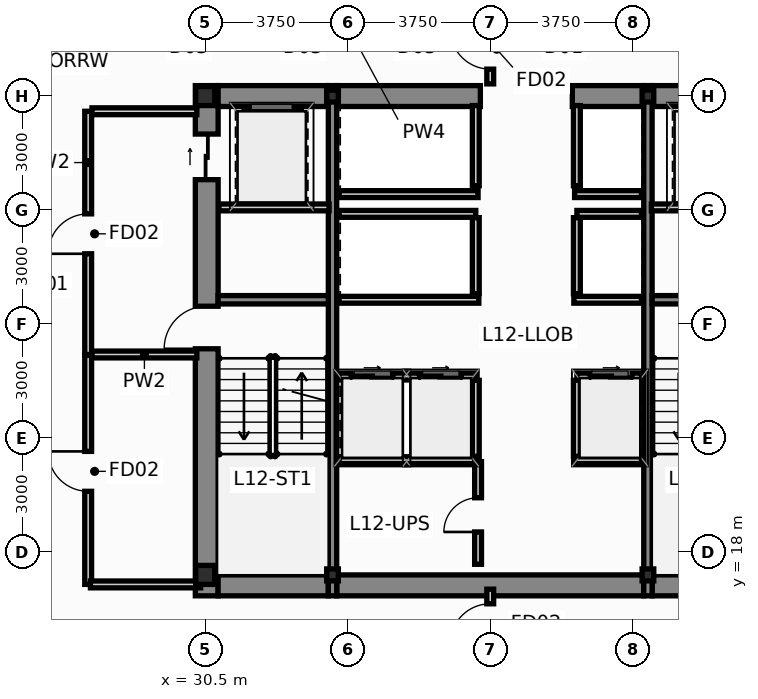
"""IFC4 building model, lengths in metres.
Left out: names, types, materials, properties, quantities, classifications, styles, units other than length and angle.
Written with IfcOpenShell. Run it as: python <this file> out.ifc"""

import sys

from ifc_helpers import new_model, si_unit, direction, frame, frame_2d, origin, origin_2d, place, context, subcontext, project, spatial, rectangle, i_section, extrude, source, transform, mapped, element, fill, save


model = new_model("IFC4")
c1 = context("Model", 3, precision=1e-05, world=origin(), true_north=direction((0.0, 1.0)))
c2 = subcontext(c1, "Body", "Model", "MODEL_VIEW")
j1 = project(units=[si_unit("LENGTHUNIT", "METRE"), si_unit("PLANEANGLEUNIT", "RADIAN")], contexts=[c1])
p1 = place(None, origin())
s1 = spatial("IfcSite", under=j1, at=p1, CompositionType="ELEMENT")
p2 = place(p1, origin())
s2 = spatial("IfcBuilding", under=s1, at=p2, CompositionType="ELEMENT")
p3 = place(p2, frame((0.0, 0.0, 49.5)))
s3 = spatial("IfcBuildingStorey", under=s2, at=p3, CompositionType="ELEMENT", Elevation=49.5)
m1 = source(origin(), c2, "Body", "SweptSolid", [
    extrude(i_section(OverallWidth=0.5, OverallDepth=0.5, WebThickness=0.028, FlangeThickness=0.04, at=origin_2d()), origin(), (0.0, 0.0, 1.0), 3.65),
])
for number, where, z_axis, x_axis in (
    (1, (30.5, 17.4, 0.0), (0.0, 0.0, 1.0), (1.0, 0.0, 0.0)),
    (2, (30.5, 30.0, 0.0), (0.0, 0.0, 1.0), (1.0, 0.0, 0.0)),
):
    element("IfcColumn", number, at=place(p3, frame(where, z_axis=z_axis, x_axis=x_axis)), inside=s3, PredefinedType="COLUMN", context=c2, shape_type="MappedRepresentation", body=[
        mapped(m1, transform((0.0, 0.0, 0.0), scale=1.0)),
    ])
m2 = source(origin(), c2, "Body", "SweptSolid", [
    extrude(i_section(OverallWidth=0.307, OverallDepth=0.315, WebThickness=0.012, FlangeThickness=0.019, at=origin_2d()), origin(), (0.0, 0.0, 1.0), 3.65),
])
for number, where, z_axis, x_axis in (
    (3, (33.85, 17.4, 0.0), (0.0, 0.0, 1.0), (1.0, 0.0, 0.0)),
    (4, (42.15, 17.4, 0.0), (0.0, 0.0, 1.0), (1.0, 0.0, 0.0)),
    (5, (33.85, 30.0, 0.0), (0.0, 0.0, 1.0), (1.0, 0.0, 0.0)),
    (6, (42.15, 30.0, 0.0), (0.0, 0.0, 1.0), (1.0, 0.0, 0.0)),
):
    element("IfcColumn", number, at=place(p3, frame(where, z_axis=z_axis, x_axis=x_axis)), inside=s3, PredefinedType="COLUMN", context=c2, shape_type="MappedRepresentation", body=[
        mapped(m2, transform((0.0, 0.0, 0.0), scale=1.0)),
    ])
p4 = place(p3, frame((30.54, 16.85, 0.0), z_axis=(0.0, 0.0, 1.0), x_axis=(0.0, 1.0, 0.0)))
e7 = element("IfcWall", 7, at=p4, inside=s3, PredefinedType="SHEAR", context=c2, shape_type="SweptSolid", body=[
    extrude(rectangle(XDim=13.425, YDim=0.6, at=frame_2d((6.712, 0.0))), origin(), (0.0, 0.0, 1.0), 3.65),
])
p5 = place(p4, frame((6.5, 0.0, 0.0)))
e8 = element("IfcOpeningElement", 8, at=p5, cuts=e7, PredefinedType="OPENING", context=c2, shape_type="SweptSolid", body=[
    extrude(rectangle(XDim=1.12, YDim=2.15, at=frame_2d((0.56, 1.075))), frame((0.0, 0.312, 0.0), z_axis=(0.0, -1.0, 0.0), x_axis=(1.0, 0.0, 0.0)), (0.0, 0.0, 1.0), 0.624),
])
p6 = place(p4, frame((10.95, 0.0, 0.0)))
e9 = element("IfcOpeningElement", 9, at=p6, cuts=e7, PredefinedType="OPENING", context=c2, shape_type="SweptSolid", body=[
    extrude(rectangle(XDim=1.2, YDim=2.2, at=frame_2d((0.6, 1.1))), frame((0.0, 0.312, 0.0), z_axis=(0.0, -1.0, 0.0), x_axis=(1.0, 0.0, 0.0)), (0.0, 0.0, 1.0), 0.624),
])
p7 = place(p3, frame((30.84, 17.125, 0.0), z_axis=(0.0, 0.0, 1.0), x_axis=(1.0, 0.0, 0.0)))
e10 = element("IfcWall", 10, at=p7, inside=s3, PredefinedType="SHEAR", context=c2, shape_type="SweptSolid", body=[
    extrude(rectangle(XDim=2.9, YDim=0.55, at=frame_2d((1.45, 0.0))), origin(), (0.0, 0.0, 1.0), 3.65),
])
p8 = place(p3, frame((33.96, 17.125, 0.0), z_axis=(0.0, 0.0, 1.0), x_axis=(1.0, 0.0, 0.0)))
e11 = element("IfcWall", 11, at=p8, inside=s3, PredefinedType="SHEAR", context=c2, shape_type="SweptSolid", body=[
    extrude(rectangle(XDim=8.08, YDim=0.55, at=frame_2d((4.04, 0.0))), origin(), (0.0, 0.0, 1.0), 3.65),
])
for number, where, z_axis, x_axis in (
    (12, (42.26, 17.125, 0.0), (0.0, 0.0, 1.0), (1.0, 0.0, 0.0)),
    (13, (30.84, 30.0, 0.0), (0.0, 0.0, 1.0), (1.0, 0.0, 0.0)),
):
    element("IfcWall", number, at=place(p3, frame(where, z_axis=z_axis, x_axis=x_axis)), inside=s3, PredefinedType="SHEAR", context=c2, shape_type="SweptSolid", body=[
        extrude(rectangle(XDim=2.9, YDim=0.55, at=frame_2d((1.45, 0.0))), origin(), (0.0, 0.0, 1.0), 3.65),
    ])
p9 = place(p3, frame((33.96, 30.0, 0.0), z_axis=(0.0, 0.0, 1.0), x_axis=(1.0, 0.0, 0.0)))
e14 = element("IfcWall", 14, at=p9, inside=s3, PredefinedType="SHEAR", context=c2, shape_type="SweptSolid", body=[
    extrude(rectangle(XDim=3.78, YDim=0.55, at=frame_2d((1.89, 0.0))), origin(), (0.0, 0.0, 1.0), 3.65),
])
p10 = place(p3, frame((40.16, 30.0, 0.0), z_axis=(0.0, 0.0, 1.0), x_axis=(1.0, 0.0, 0.0)))
e15 = element("IfcWall", 15, at=p10, inside=s3, PredefinedType="SHEAR", context=c2, shape_type="SweptSolid", body=[
    extrude(rectangle(XDim=1.88, YDim=0.55, at=frame_2d((0.94, 0.0))), origin(), (0.0, 0.0, 1.0), 3.65),
])
p11 = place(p3, frame((42.26, 30.0, 0.0), z_axis=(0.0, 0.0, 1.0), x_axis=(1.0, 0.0, 0.0)))
e16 = element("IfcWall", 16, at=p11, inside=s3, PredefinedType="SHEAR", context=c2, shape_type="SweptSolid", body=[
    extrude(rectangle(XDim=2.9, YDim=0.55, at=frame_2d((1.45, 0.0))), origin(), (0.0, 0.0, 1.0), 3.65),
])
for number, where, z_axis, x_axis in (
    (17, (33.85, 16.85, 0.0), (0.0, 0.0, 1.0), (0.0, 1.0, 0.0)),
    (18, (42.15, 16.85, 0.0), (0.0, 0.0, 1.0), (0.0, 1.0, 0.0)),
):
    element("IfcWall", number, at=place(p3, frame(where, z_axis=z_axis, x_axis=x_axis)), inside=s3, PredefinedType="SHEAR", context=c2, shape_type="SweptSolid", body=[
        extrude(rectangle(XDim=13.425, YDim=0.22, at=frame_2d((6.712, 0.0))), origin(), (0.0, 0.0, 1.0), 3.65),
    ])
for number, where, z_axis, x_axis in (
    (19, (30.84, 24.64, 0.0), (0.0, 0.0, 1.0), (1.0, 0.0, 0.0)),
    (20, (42.26, 24.64, 0.0), (0.0, 0.0, 1.0), (1.0, 0.0, 0.0)),
):
    element("IfcWall", number, at=place(p3, frame(where, z_axis=z_axis, x_axis=x_axis)), inside=s3, PredefinedType="SHEAR", context=c2, shape_type="SweptSolid", body=[
        extrude(rectangle(XDim=2.9, YDim=0.22, at=frame_2d((1.45, 0.0))), origin(), (0.0, 0.0, 1.0), 3.65),
    ])
p12 = place(p3, frame((34.02, 22.62, 0.0), z_axis=(0.0, 0.0, 1.0), x_axis=(1.0, 0.0, 0.0)))
e21 = element("IfcWall", 21, at=p12, inside=s3, PredefinedType="PARTITIONING", context=c2, shape_type="SweptSolid", body=[
    extrude(rectangle(XDim=3.6, YDim=0.18, at=frame_2d((1.8, 0.0))), origin(), (0.0, 0.0, 1.0), 3.4),
])
p13 = place(p12, frame((0.32, 0.0, 0.0)))
e22 = element("IfcOpeningElement", 22, at=p13, cuts=e21, PredefinedType="OPENING", context=c2, shape_type="SweptSolid", body=[
    extrude(rectangle(XDim=1.1, YDim=2.2, at=frame_2d((0.55, 1.1))), frame((0.0, 0.102, 0.0), z_axis=(0.0, -1.0, 0.0), x_axis=(1.0, 0.0, 0.0)), (0.0, 0.0, 1.0), 0.204),
])
p14 = place(p12, frame((2.12, 0.0, 0.0)))
e23 = element("IfcOpeningElement", 23, at=p14, cuts=e21, PredefinedType="OPENING", context=c2, shape_type="SweptSolid", body=[
    extrude(rectangle(XDim=1.1, YDim=2.2, at=frame_2d((0.55, 1.1))), frame((0.0, 0.102, 0.0), z_axis=(0.0, -1.0, 0.0), x_axis=(1.0, 0.0, 0.0)), (0.0, 0.0, 1.0), 0.204),
])
p15 = place(p3, frame((40.28, 22.62, 0.0), z_axis=(0.0, 0.0, 1.0), x_axis=(1.0, 0.0, 0.0)))
e24 = element("IfcWall", 24, at=p15, inside=s3, PredefinedType="PARTITIONING", context=c2, shape_type="SweptSolid", body=[
    extrude(rectangle(XDim=1.7, YDim=0.18, at=frame_2d((0.85, 0.0))), origin(), (0.0, 0.0, 1.0), 3.4),
])
p16 = place(p15, frame((0.35, 0.0, 0.0)))
e25 = element("IfcOpeningElement", 25, at=p16, cuts=e24, PredefinedType="OPENING", context=c2, shape_type="SweptSolid", body=[
    extrude(rectangle(XDim=1.1, YDim=2.2, at=frame_2d((0.55, 1.1))), frame((0.0, 0.102, 0.0), z_axis=(0.0, -1.0, 0.0), x_axis=(1.0, 0.0, 0.0)), (0.0, 0.0, 1.0), 0.204),
])
for number, where, z_axis, x_axis in (
    (26, (37.62, 20.52, 0.0), (0.0, 0.0, 1.0), (0.0, 1.0, 0.0)),
    (27, (40.28, 20.52, 0.0), (0.0, 0.0, 1.0), (0.0, 1.0, 0.0)),
):
    element("IfcWall", number, at=place(p3, frame(where, z_axis=z_axis, x_axis=x_axis)), inside=s3, PredefinedType="PARTITIONING", context=c2, shape_type="SweptSolid", body=[
        extrude(rectangle(XDim=2.0, YDim=0.18, at=frame_2d((1.0, 0.0))), origin(), (0.0, 0.0, 1.0), 3.4),
    ])
p17 = place(p3, frame((34.02, 26.9, 0.0), z_axis=(0.0, 0.0, 1.0), x_axis=(1.0, 0.0, 0.0)))
e28 = element("IfcWall", 28, at=p17, inside=s3, PredefinedType="PARTITIONING", context=c2, shape_type="SweptSolid", body=[
    extrude(rectangle(XDim=3.6, YDim=0.18, at=frame_2d((1.8, 0.0))), origin(), (0.0, 0.0, 1.0), 3.4),
])
p18 = place(p3, frame((40.28, 26.9, 0.0), z_axis=(0.0, 0.0, 1.0), x_axis=(1.0, 0.0, 0.0)))
e29 = element("IfcWall", 29, at=p18, inside=s3, PredefinedType="PARTITIONING", context=c2, shape_type="SweptSolid", body=[
    extrude(rectangle(XDim=1.7, YDim=0.18, at=frame_2d((0.85, 0.0))), origin(), (0.0, 0.0, 1.0), 3.4),
])
for number, where, z_axis, x_axis in (
    (30, (37.62, 24.8, 0.0), (0.0, 0.0, 1.0), (0.0, 1.0, 0.0)),
    (31, (40.28, 24.8, 0.0), (0.0, 0.0, 1.0), (0.0, 1.0, 0.0)),
):
    element("IfcWall", number, at=place(p3, frame(where, z_axis=z_axis, x_axis=x_axis)), inside=s3, PredefinedType="PARTITIONING", context=c2, shape_type="SweptSolid", body=[
        extrude(rectangle(XDim=2.0, YDim=0.18, at=frame_2d((1.0, 0.0))), origin(), (0.0, 0.0, 1.0), 3.4),
    ])
p19 = place(p3, frame((34.02, 24.64, 0.0), z_axis=(0.0, 0.0, 1.0), x_axis=(1.0, 0.0, 0.0)))
e32 = element("IfcWall", 32, at=p19, inside=s3, PredefinedType="PARTITIONING", context=c2, shape_type="SweptSolid", body=[
    extrude(rectangle(XDim=3.68, YDim=0.18, at=frame_2d((1.84, 0.0))), origin(), (0.0, 0.0, 1.0), 3.4),
])
p20 = place(p3, frame((40.2, 24.64, 0.0), z_axis=(0.0, 0.0, 1.0), x_axis=(1.0, 0.0, 0.0)))
e33 = element("IfcWall", 33, at=p20, inside=s3, PredefinedType="PARTITIONING", context=c2, shape_type="SweptSolid", body=[
    extrude(rectangle(XDim=1.78, YDim=0.18, at=frame_2d((0.89, 0.0))), origin(), (0.0, 0.0, 1.0), 3.4),
])
p21 = place(p3, frame((34.02, 27.42, 0.0), z_axis=(0.0, 0.0, 1.0), x_axis=(1.0, 0.0, 0.0)))
e34 = element("IfcWall", 34, at=p21, inside=s3, PredefinedType="PARTITIONING", context=c2, shape_type="SweptSolid", body=[
    extrude(rectangle(XDim=3.66, YDim=0.18, at=frame_2d((1.83, 0.0))), origin(), (0.0, 0.0, 1.0), 3.4),
])
p22 = place(p3, frame((40.22, 27.42, 0.0), z_axis=(0.0, 0.0, 1.0), x_axis=(1.0, 0.0, 0.0)))
e35 = element("IfcWall", 35, at=p22, inside=s3, PredefinedType="PARTITIONING", context=c2, shape_type="SweptSolid", body=[
    extrude(rectangle(XDim=1.76, YDim=0.18, at=frame_2d((0.88, 0.0))), origin(), (0.0, 0.0, 1.0), 3.4),
])
for number, where, z_axis, x_axis in (
    (36, (37.62, 27.64, 0.0), (0.0, 0.0, 1.0), (0.0, 1.0, 0.0)),
    (37, (40.28, 27.64, 0.0), (0.0, 0.0, 1.0), (0.0, 1.0, 0.0)),
):
    element("IfcWall", number, at=place(p3, frame(where, z_axis=z_axis, x_axis=x_axis)), inside=s3, PredefinedType="PARTITIONING", context=c2, shape_type="SweptSolid", body=[
        extrude(rectangle(XDim=2.11, YDim=0.18, at=frame_2d((1.055, 0.0))), origin(), (0.0, 0.0, 1.0), 3.4),
    ])
p23 = place(p3, frame((27.42, 23.2, 0.0), z_axis=(0.0, 0.0, 1.0), x_axis=(0.0, 1.0, 0.0)))
e38 = element("IfcWall", 38, at=p23, inside=s3, PredefinedType="PARTITIONING", context=c2, shape_type="SweptSolid", body=[
    extrude(rectangle(XDim=6.4, YDim=0.18, at=frame_2d((3.2, 0.0))), origin(), (0.0, 0.0, 1.0), 3.4),
])
p24 = place(p23, frame((2.65, 0.0, 0.0)))
e39 = element("IfcOpeningElement", 39, at=p24, cuts=e38, PredefinedType="OPENING", context=c2, shape_type="SweptSolid", body=[
    extrude(rectangle(XDim=1.05, YDim=2.15, at=frame_2d((0.525, 1.075))), frame((0.0, 0.102, 0.0), z_axis=(0.0, -1.0, 0.0), x_axis=(1.0, 0.0, 0.0)), (0.0, 0.0, 1.0), 0.204),
])
p25 = place(p3, frame((27.52, 23.2, 0.0), z_axis=(0.0, 0.0, 1.0), x_axis=(1.0, 0.0, 0.0)))
e40 = element("IfcWall", 40, at=p25, inside=s3, PredefinedType="PARTITIONING", context=c2, shape_type="SweptSolid", body=[
    extrude(rectangle(XDim=2.76, YDim=0.18, at=frame_2d((1.38, 0.0))), origin(), (0.0, 0.0, 1.0), 3.4),
])
p26 = place(p3, frame((27.52, 29.6, 0.0), z_axis=(0.0, 0.0, 1.0), x_axis=(1.0, 0.0, 0.0)))
e41 = element("IfcWall", 41, at=p26, inside=s3, PredefinedType="PARTITIONING", context=c2, shape_type="SweptSolid", body=[
    extrude(rectangle(XDim=2.76, YDim=0.18, at=frame_2d((1.38, 0.0))), origin(), (0.0, 0.0, 1.0), 2.783),
])
for number, where, z_axis, x_axis in (
    (42, (30.86, 27.07, 0.0), (0.0, 0.0, 1.0), (1.0, 0.0, 0.0)),
    (43, (42.24, 27.07, 0.0), (0.0, 0.0, 1.0), (1.0, 0.0, 0.0)),
):
    element("IfcWall", number, at=place(p3, frame(where, z_axis=z_axis, x_axis=x_axis)), inside=s3, PredefinedType="PARTITIONING", context=c2, shape_type="SweptSolid", body=[
        extrude(rectangle(XDim=2.9, YDim=0.18, at=frame_2d((1.45, 0.0))), origin(), (0.0, 0.0, 1.0), 3.4),
    ])
p27 = place(p3, frame((34.02, 20.42, 0.0), z_axis=(0.0, 0.0, 1.0), x_axis=(1.0, 0.0, 0.0)))
e44 = element("IfcWall", 44, at=p27, inside=s3, PredefinedType="PARTITIONING", context=c2, shape_type="SweptSolid", body=[
    extrude(rectangle(XDim=3.64, YDim=0.18, at=frame_2d((1.82, 0.0))), origin(), (0.0, 0.0, 1.0), 3.4),
])
p28 = place(p3, frame((40.22, 20.42, 0.0), z_axis=(0.0, 0.0, 1.0), x_axis=(1.0, 0.0, 0.0)))
e45 = element("IfcWall", 45, at=p28, inside=s3, PredefinedType="PARTITIONING", context=c2, shape_type="SweptSolid", body=[
    extrude(rectangle(XDim=1.76, YDim=0.18, at=frame_2d((0.88, 0.0))), origin(), (0.0, 0.0, 1.0), 3.4),
])
p29 = place(p3, frame((37.68, 17.68, 0.0), z_axis=(0.0, 0.0, 1.0), x_axis=(0.0, 1.0, 0.0)))
e46 = element("IfcWall", 46, at=p29, inside=s3, PredefinedType="PARTITIONING", context=c2, shape_type="SweptSolid", body=[
    extrude(rectangle(XDim=2.7, YDim=0.18, at=frame_2d((1.35, 0.0))), origin(), (0.0, 0.0, 1.0), 3.4),
])
p30 = place(p29, frame((0.85, 0.0, 0.0)))
e47 = element("IfcOpeningElement", 47, at=p30, cuts=e46, PredefinedType="OPENING", context=c2, shape_type="SweptSolid", body=[
    extrude(rectangle(XDim=0.9, YDim=2.1, at=frame_2d((0.45, 1.05))), frame((0.0, 0.102, 0.0), z_axis=(0.0, -1.0, 0.0), x_axis=(1.0, 0.0, 0.0)), (0.0, 0.0, 1.0), 0.204),
])
p31 = place(p3, frame((27.42, 17.15, 0.0), z_axis=(0.0, 0.0, 1.0), x_axis=(0.0, 1.0, 0.0)))
e48 = element("IfcWall", 48, at=p31, inside=s3, PredefinedType="PARTITIONING", context=c2, shape_type="SweptSolid", body=[
    extrude(rectangle(XDim=6.03, YDim=0.18, at=frame_2d((3.015, 0.0))), origin(), (0.0, 0.0, 1.0), 3.026),
])
p32 = place(p31, frame((2.45, 0.0, 0.0)))
e49 = element("IfcOpeningElement", 49, at=p32, cuts=e48, PredefinedType="OPENING", context=c2, shape_type="SweptSolid", body=[
    extrude(rectangle(XDim=1.05, YDim=2.15, at=frame_2d((0.525, 1.075))), frame((0.0, 0.102, 0.0), z_axis=(0.0, -1.0, 0.0), x_axis=(1.0, 0.0, 0.0)), (0.0, 0.0, 1.0), 0.204),
])
p33 = place(p3, frame((27.48, 17.15, 0.0), z_axis=(0.0, 0.0, 1.0), x_axis=(1.0, 0.0, 0.0)))
e50 = element("IfcWall", 50, at=p33, inside=s3, PredefinedType="PARTITIONING", context=c2, shape_type="SweptSolid", body=[
    extrude(rectangle(XDim=2.9, YDim=0.18, at=frame_2d((1.45, 0.0))), origin(), (0.0, 0.0, 1.0), 2.783),
])
p34 = place(p3, frame((38.0, 15.205, 0.0), z_axis=(0.0, 0.0, 1.0), x_axis=(0.0, 1.0, 0.0)))
e51 = element("IfcWall", 51, at=p34, inside=s3, PredefinedType="PARTITIONING", context=c2, shape_type="SweptSolid", body=[
    extrude(rectangle(XDim=1.82, YDim=0.18, at=frame_2d((0.91, 0.0))), origin(), (0.0, 0.0, 1.0), 3.4),
])
p35 = place(p34, frame((0.385, 0.0, 0.0)))
e52 = element("IfcOpeningElement", 52, at=p35, cuts=e51, PredefinedType="OPENING", context=c2, shape_type="SweptSolid", body=[
    extrude(rectangle(XDim=1.05, YDim=2.15, at=frame_2d((0.525, 1.075))), frame((0.0, 0.102, 0.0), z_axis=(0.0, -1.0, 0.0), x_axis=(1.0, 0.0, 0.0)), (0.0, 0.0, 1.0), 0.204),
])
p36 = place(p3, frame((38.0, 30.32, 0.0), z_axis=(0.0, 0.0, 1.0), x_axis=(0.0, 1.0, 0.0)))
e53 = element("IfcWall", 53, at=p36, inside=s3, PredefinedType="PARTITIONING", context=c2, shape_type="SweptSolid", body=[
    extrude(rectangle(XDim=1.825, YDim=0.18, at=frame_2d((0.913, 0.0))), origin(), (0.0, 0.0, 1.0), 3.4),
])
p37 = place(p36, frame((0.388, 0.0, 0.0)))
e54 = element("IfcOpeningElement", 54, at=p37, cuts=e53, PredefinedType="OPENING", context=c2, shape_type="SweptSolid", body=[
    extrude(rectangle(XDim=1.05, YDim=2.15, at=frame_2d((0.525, 1.075))), frame((0.0, 0.102, 0.0), z_axis=(0.0, -1.0, 0.0), x_axis=(1.0, 0.0, 0.0)), (0.0, 0.0, 1.0), 0.204),
])
p38 = place(p5, origin())
e55 = element("IfcDoor", 55, at=p38, inside=s3, OperationType="SINGLE_SWING_LEFT", PredefinedType="DOOR", context=c2, shape_type="SweptSolid", body=[
    extrude(rectangle(XDim=1.12, YDim=2.15, at=frame_2d((0.56, 1.075))), frame((0.0, 0.025, 0.0), z_axis=(0.0, -1.0, 0.0), x_axis=(1.0, 0.0, 0.0)), (0.0, 0.0, 1.0), 0.05),
])
fill(e8, e55)
p39 = place(p6, origin())
e56 = element("IfcDoor", 56, at=p39, inside=s3, OperationType="SLIDING_TO_LEFT", PredefinedType="DOOR", context=c2, shape_type="SweptSolid", body=[
    extrude(rectangle(XDim=1.2, YDim=2.2, at=frame_2d((0.6, 1.1))), frame((0.0, 0.025, 0.0), z_axis=(0.0, -1.0, 0.0), x_axis=(1.0, 0.0, 0.0)), (0.0, 0.0, 1.0), 0.05),
])
fill(e9, e56)
p40 = place(p13, origin())
e57 = element("IfcDoor", 57, at=p40, inside=s3, OperationType="SLIDING_TO_LEFT", PredefinedType="DOOR", context=c2, shape_type="SweptSolid", body=[
    extrude(rectangle(XDim=1.1, YDim=2.2, at=frame_2d((0.55, 1.1))), frame((0.0, 0.025, 0.0), z_axis=(0.0, -1.0, 0.0), x_axis=(1.0, 0.0, 0.0)), (0.0, 0.0, 1.0), 0.05),
])
fill(e22, e57)
p41 = place(p14, origin())
e58 = element("IfcDoor", 58, at=p41, inside=s3, OperationType="SLIDING_TO_RIGHT", PredefinedType="DOOR", context=c2, shape_type="SweptSolid", body=[
    extrude(rectangle(XDim=1.1, YDim=2.2, at=frame_2d((0.55, 1.1))), frame((0.0, 0.025, 0.0), z_axis=(0.0, -1.0, 0.0), x_axis=(1.0, 0.0, 0.0)), (0.0, 0.0, 1.0), 0.05),
])
fill(e23, e58)
p42 = place(p16, origin())
e59 = element("IfcDoor", 59, at=p42, inside=s3, OperationType="SLIDING_TO_LEFT", PredefinedType="DOOR", context=c2, shape_type="SweptSolid", body=[
    extrude(rectangle(XDim=1.1, YDim=2.2, at=frame_2d((0.55, 1.1))), frame((0.0, 0.025, 0.0), z_axis=(0.0, -1.0, 0.0), x_axis=(1.0, 0.0, 0.0)), (0.0, 0.0, 1.0), 0.05),
])
fill(e25, e59)
p43 = place(p24, origin())
e60 = element("IfcDoor", 60, at=p43, inside=s3, OperationType="SINGLE_SWING_LEFT", PredefinedType="DOOR", context=c2, shape_type="SweptSolid", body=[
    extrude(rectangle(XDim=1.05, YDim=2.15, at=frame_2d((0.525, 1.075))), frame((0.0, 0.025, 0.0), z_axis=(0.0, -1.0, 0.0), x_axis=(1.0, 0.0, 0.0)), (0.0, 0.0, 1.0), 0.05),
])
fill(e39, e60)
p44 = place(p30, origin())
e61 = element("IfcDoor", 61, at=p44, inside=s3, OperationType="SINGLE_SWING_LEFT", PredefinedType="DOOR", context=c2, shape_type="SweptSolid", body=[
    extrude(rectangle(XDim=0.9, YDim=2.1, at=frame_2d((0.45, 1.05))), frame((0.0, 0.025, 0.0), z_axis=(0.0, -1.0, 0.0), x_axis=(1.0, 0.0, 0.0)), (0.0, 0.0, 1.0), 0.05),
])
fill(e47, e61)
p45 = place(p32, origin())
e62 = element("IfcDoor", 62, at=p45, inside=s3, OperationType="SINGLE_SWING_RIGHT", PredefinedType="DOOR", context=c2, shape_type="SweptSolid", body=[
    extrude(rectangle(XDim=1.05, YDim=2.15, at=frame_2d((0.525, 1.075))), frame((0.0, 0.025, 0.0), z_axis=(0.0, -1.0, 0.0), x_axis=(1.0, 0.0, 0.0)), (0.0, 0.0, 1.0), 0.05),
])
fill(e49, e62)
p46 = place(p35, origin())
e63 = element("IfcDoor", 63, at=p46, inside=s3, OperationType="SINGLE_SWING_LEFT", PredefinedType="DOOR", context=c2, shape_type="SweptSolid", body=[
    extrude(rectangle(XDim=1.05, YDim=2.15, at=frame_2d((0.525, 1.075))), frame((0.0, 0.025, 0.0), z_axis=(0.0, -1.0, 0.0), x_axis=(1.0, 0.0, 0.0)), (0.0, 0.0, 1.0), 0.05),
])
fill(e52, e63)
p47 = place(p37, origin())
e64 = element("IfcDoor", 64, at=p47, inside=s3, OperationType="SINGLE_SWING_RIGHT", PredefinedType="DOOR", context=c2, shape_type="SweptSolid", body=[
    extrude(rectangle(XDim=1.05, YDim=2.15, at=frame_2d((0.525, 1.075))), frame((0.0, 0.025, 0.0), z_axis=(0.0, -1.0, 0.0), x_axis=(1.0, 0.0, 0.0)), (0.0, 0.0, 1.0), 0.05),
])
fill(e54, e64)
save(model, sys.argv[1])
